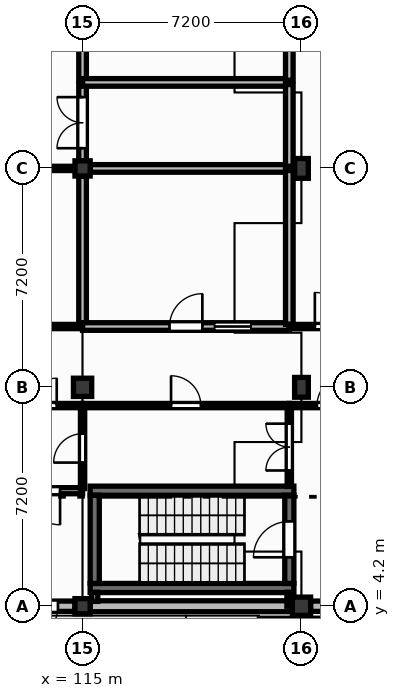
"""IFC4 building model, lengths in metres.
Left out: names, types, materials, properties, quantities, classifications, styles, units other than length and angle.
Written with IfcOpenShell. Run it as: python <this file> out.ifc"""

import sys

from ifc_helpers import new_model, si_unit, direction, frame, frame_2d, origin, origin_2d, place, context, subcontext, project, spatial, rectangle, extrude, element, fill, save


model = new_model("IFC4")
c1 = context("Model", 3, precision=1e-05, world=origin(), true_north=direction((0.0, 1.0)))
c2 = subcontext(c1, "Body", "Model", "MODEL_VIEW")
j1 = project(units=[si_unit("LENGTHUNIT", "METRE"), si_unit("PLANEANGLEUNIT", "RADIAN")], contexts=[c1])
p1 = place(None, origin())
s1 = spatial("IfcSite", under=j1, at=p1, CompositionType="ELEMENT")
p2 = place(p1, origin())
s2 = spatial("IfcBuilding", under=s1, at=p2, CompositionType="ELEMENT")
p3 = place(p2, origin())
s3 = spatial("IfcBuildingStorey", under=s2, at=p3, CompositionType="ELEMENT", Elevation=0.0)
p4 = place(p3, frame((115.0, 4.2, 0.0), z_axis=(0.0, 0.0, 1.0), x_axis=(1.0, 0.0, 0.0)))
e1 = element("IfcColumn", 1, at=p4, inside=s3, PredefinedType="COLUMN", context=c2, shape_type="SweptSolid", body=[
    extrude(rectangle(XDim=0.5, YDim=0.5, at=origin_2d()), origin(), (0.0, 0.0, 1.0), 4.2),
])
p5 = place(p3, frame((115.0, 11.4, 0.0), z_axis=(0.0, 0.0, 1.0), x_axis=(1.0, 0.0, 0.0)))
e2 = element("IfcColumn", 2, at=p5, inside=s3, PredefinedType="COLUMN", context=c2, shape_type="SweptSolid", body=[
    extrude(rectangle(XDim=0.6, YDim=0.6, at=origin_2d()), origin(), (0.0, 0.0, 1.0), 4.2),
])
p6 = place(p3, frame((115.0, 18.6, 0.0), z_axis=(0.0, 0.0, 1.0), x_axis=(1.0, 0.0, 0.0)))
e3 = element("IfcColumn", 3, at=p6, inside=s3, PredefinedType="COLUMN", context=c2, shape_type="SweptSolid", body=[
    extrude(rectangle(XDim=0.5, YDim=0.5, at=origin_2d()), origin(), (0.0, 0.0, 1.0), 4.2),
])
p7 = place(p3, frame((122.2, 4.2, 0.0), z_axis=(0.0, 0.0, 1.0), x_axis=(1.0, 0.0, 0.0)))
e4 = element("IfcColumn", 4, at=p7, inside=s3, PredefinedType="COLUMN", context=c2, shape_type="SweptSolid", body=[
    extrude(rectangle(XDim=0.6, YDim=0.6, at=origin_2d()), origin(), (0.0, 0.0, 1.0), 4.2),
])
for number, where, z_axis, x_axis in (
    (5, (122.2, 11.4, 0.0), (0.0, 0.0, 1.0), (1.0, 0.0, 0.0)),
    (6, (122.2, 18.6, 0.0), (0.0, 0.0, 1.0), (1.0, 0.0, 0.0)),
):
    element("IfcColumn", number, at=place(p3, frame(where, z_axis=z_axis, x_axis=x_axis)), inside=s3, PredefinedType="COLUMN", context=c2, shape_type="SweptSolid", body=[
        extrude(rectangle(XDim=0.45, YDim=0.65, at=origin_2d()), origin(), (0.0, 0.0, 1.0), 4.2),
    ])
p8 = place(p3, frame((108.025, 4.2, 0.0), z_axis=(0.0, 0.0, 1.0), x_axis=(1.0, 0.0, 0.0)))
e7 = element("IfcWall", 7, at=p8, inside=s3, PredefinedType="SOLIDWALL", context=c2, shape_type="SweptSolid", body=[
    extrude(rectangle(XDim=6.725, YDim=0.34, at=frame_2d((3.363, 0.0))), origin(), (0.0, 0.0, 1.0), 3.68),
])
p9 = place(p8, frame((4.985, 0.0, 0.0)))
e8 = element("IfcOpeningElement", 8, at=p9, cuts=e7, PredefinedType="OPENING", context=c2, shape_type="SweptSolid", body=[
    extrude(rectangle(XDim=1.18, YDim=2.2, at=frame_2d((0.59, 1.1))), frame((0.0, 0.18, 0.0), z_axis=(0.0, -1.0, 0.0), x_axis=(1.0, 0.0, 0.0)), (0.0, 0.0, 1.0), 0.36),
])
p10 = place(p8, frame((1.522, 0.0, 1.35)))
e9 = element("IfcOpeningElement", 9, at=p10, cuts=e7, PredefinedType="OPENING", context=c2, shape_type="SweptSolid", body=[
    extrude(rectangle(XDim=1.45, YDim=1.4, at=frame_2d((0.725, 0.7))), frame((0.0, 0.18, 0.0), z_axis=(0.0, -1.0, 0.0), x_axis=(1.0, 0.0, 0.0)), (0.0, 0.0, 1.0), 0.36),
])
p11 = place(p3, frame((115.25, 4.2, 0.0), z_axis=(0.0, 0.0, 1.0), x_axis=(1.0, 0.0, 0.0)))
e10 = element("IfcWall", 10, at=p11, inside=s3, PredefinedType="SOLIDWALL", context=c2, shape_type="SweptSolid", body=[
    extrude(rectangle(XDim=6.65, YDim=0.36, at=frame_2d((3.325, 0.0))), origin(), (0.0, 0.0, 1.0), 3.68),
])
p12 = place(p3, frame((122.5, 4.2, 0.0), z_axis=(0.0, 0.0, 1.0), x_axis=(1.0, 0.0, 0.0)))
e11 = element("IfcWall", 11, at=p12, inside=s3, PredefinedType="SOLIDWALL", context=c2, shape_type="SweptSolid", body=[
    extrude(rectangle(XDim=5.85, YDim=0.34, at=frame_2d((2.925, 0.0))), origin(), (0.0, 0.0, 1.0), 3.68),
])
p13 = place(p12, frame((3.305, 0.0, 1.0)))
e12 = element("IfcOpeningElement", 12, at=p13, cuts=e11, PredefinedType="OPENING", context=c2, shape_type="SweptSolid", body=[
    extrude(rectangle(XDim=1.22, YDim=2.2, at=frame_2d((0.61, 1.1))), frame((0.0, 0.18, 0.0), z_axis=(0.0, -1.0, 0.0), x_axis=(1.0, 0.0, 0.0)), (0.0, 0.0, 1.0), 0.36),
])
for number, where, z_axis, x_axis in (
    (13, (115.25, 4.8, 0.0), (0.0, 0.0, 1.0), (1.0, 0.0, 0.0)),
    (14, (115.25, 8.0, 0.0), (0.0, 0.0, 1.0), (1.0, 0.0, 0.0)),
):
    element("IfcWall", number, at=place(p3, frame(where, z_axis=z_axis, x_axis=x_axis)), inside=s3, PredefinedType="SHEAR", context=c2, shape_type="SweptSolid", body=[
        extrude(rectangle(XDim=6.7, YDim=0.3, at=frame_2d((3.35, 0.0))), origin(), (0.0, 0.0, 1.0), 4.25),
    ])
p14 = place(p3, frame((115.4, 4.95, 0.0), z_axis=(0.0, 0.0, 1.0), x_axis=(0.0, 1.0, 0.0)))
e15 = element("IfcWall", 15, at=p14, inside=s3, PredefinedType="SHEAR", context=c2, shape_type="SweptSolid", body=[
    extrude(rectangle(XDim=2.9, YDim=0.3, at=frame_2d((1.45, 0.0))), origin(), (0.0, 0.0, 1.0), 4.25),
])
p15 = place(p3, frame((121.8, 4.95, 0.0), z_axis=(0.0, 0.0, 1.0), x_axis=(0.0, 1.0, 0.0)))
e16 = element("IfcWall", 16, at=p15, inside=s3, PredefinedType="SHEAR", context=c2, shape_type="SweptSolid", body=[
    extrude(rectangle(XDim=2.9, YDim=0.3, at=frame_2d((1.45, 0.0))), origin(), (0.0, 0.0, 1.0), 4.25),
])
p16 = place(p15, frame((0.86, 0.0, 0.0)))
e17 = element("IfcOpeningElement", 17, at=p16, cuts=e16, PredefinedType="OPENING", context=c2, shape_type="SweptSolid", body=[
    extrude(rectangle(XDim=1.18, YDim=2.15, at=frame_2d((0.59, 1.075))), frame((0.0, 0.16, 0.0), z_axis=(0.0, -1.0, 0.0), x_axis=(1.0, 0.0, 0.0)), (0.0, 0.0, 1.0), 0.32),
])
p17 = place(p3, frame((110.6, 13.4, 0.0), z_axis=(0.0, 0.0, 1.0), x_axis=(1.0, 0.0, 0.0)))
e18 = element("IfcWall", 18, at=p17, inside=s3, PredefinedType="PARTITIONING", context=c2, shape_type="SweptSolid", body=[
    extrude(rectangle(XDim=4.4, YDim=0.14, at=frame_2d((2.2, 0.0))), origin(), (0.0, 0.0, 1.0), 4.18),
])
p18 = place(p3, frame((110.6, 18.6, 0.0), z_axis=(0.0, 0.0, 1.0), x_axis=(1.0, 0.0, 0.0)))
e19 = element("IfcWall", 19, at=p18, inside=s3, PredefinedType="PARTITIONING", context=c2, shape_type="SweptSolid", body=[
    extrude(rectangle(XDim=4.15, YDim=0.14, at=frame_2d((2.075, 0.0))), origin(), (0.0, 0.0, 1.0), 3.25),
])
p19 = place(p3, frame((112.4, 8.0, 0.0), z_axis=(0.0, 0.0, 1.0), x_axis=(1.0, 0.0, 0.0)))
e20 = element("IfcWall", 20, at=p19, inside=s3, PredefinedType="PARTITIONING", context=c2, shape_type="SweptSolid", body=[
    extrude(rectangle(XDim=2.6, YDim=0.2, at=frame_2d((1.3, 0.0))), origin(), (0.0, 0.0, 1.0), 4.18),
])
p20 = place(p19, frame((0.74, 0.0, 0.0)))
e21 = element("IfcOpeningElement", 21, at=p20, cuts=e20, PredefinedType="OPENING", context=c2, shape_type="SweptSolid", body=[
    extrude(rectangle(XDim=1.12, YDim=2.1, at=frame_2d((0.56, 1.05))), frame((0.0, 0.11, 0.0), z_axis=(0.0, -1.0, 0.0), x_axis=(1.0, 0.0, 0.0)), (0.0, 0.0, 1.0), 0.22),
])
p21 = place(p3, frame((112.4, 10.8, 0.0), z_axis=(0.0, 0.0, 1.0), x_axis=(1.0, 0.0, 0.0)))
e22 = element("IfcWall", 22, at=p21, inside=s3, PredefinedType="PARTITIONING", context=c2, shape_type="SweptSolid", body=[
    extrude(rectangle(XDim=2.6, YDim=0.14, at=frame_2d((1.3, 0.0))), origin(), (0.0, 0.0, 1.0), 4.18),
])
p22 = place(p21, frame((0.85, 0.0, 0.0)))
e23 = element("IfcOpeningElement", 23, at=p22, cuts=e22, PredefinedType="OPENING", context=c2, shape_type="SweptSolid", body=[
    extrude(rectangle(XDim=0.9, YDim=2.1, at=frame_2d((0.45, 1.05))), frame((0.0, 0.08, 0.0), z_axis=(0.0, -1.0, 0.0), x_axis=(1.0, 0.0, 0.0)), (0.0, 0.0, 1.0), 0.16),
])
p23 = place(p3, frame((115.0, 8.07, 0.0), z_axis=(0.0, 0.0, 1.0), x_axis=(0.0, 1.0, 0.0)))
e24 = element("IfcWall", 24, at=p23, inside=s3, PredefinedType="PARTITIONING", context=c2, shape_type="SweptSolid", body=[
    extrude(rectangle(XDim=2.66, YDim=0.14, at=frame_2d((1.33, 0.0))), origin(), (0.0, 0.0, 1.0), 3.5),
])
p24 = place(p23, frame((0.855, 0.0, 0.0)))
e25 = element("IfcOpeningElement", 25, at=p24, cuts=e24, PredefinedType="OPENING", context=c2, shape_type="SweptSolid", body=[
    extrude(rectangle(XDim=0.95, YDim=2.1, at=frame_2d((0.475, 1.05))), frame((0.0, 0.08, 0.0), z_axis=(0.0, -1.0, 0.0), x_axis=(1.0, 0.0, 0.0)), (0.0, 0.0, 1.0), 0.16),
])
p25 = place(p3, frame((115.0, 10.8, 0.0), z_axis=(0.0, 0.0, 1.0), x_axis=(1.0, 0.0, 0.0)))
e26 = element("IfcWall", 26, at=p25, inside=s3, PredefinedType="PARTITIONING", context=c2, shape_type="SweptSolid", body=[
    extrude(rectangle(XDim=6.8, YDim=0.14, at=frame_2d((3.4, 0.0))), origin(), (0.0, 0.0, 1.0), 4.18),
])
p26 = place(p25, frame((2.91, 0.0, 0.0)))
e27 = element("IfcOpeningElement", 27, at=p26, cuts=e26, PredefinedType="OPENING", context=c2, shape_type="SweptSolid", body=[
    extrude(rectangle(XDim=0.98, YDim=2.15, at=frame_2d((0.49, 1.075))), frame((0.0, 0.08, 0.0), z_axis=(0.0, -1.0, 0.0), x_axis=(1.0, 0.0, 0.0)), (0.0, 0.0, 1.0), 0.16),
])
p27 = place(p3, frame((115.0, 13.47, 0.0), z_axis=(0.0, 0.0, 1.0), x_axis=(0.0, 1.0, 0.0)))
e28 = element("IfcWall", 28, at=p27, inside=s3, PredefinedType="SOLIDWALL", context=c2, shape_type="SweptSolid", body=[
    extrude(rectangle(XDim=4.88, YDim=0.25, at=frame_2d((2.44, 0.0))), origin(), (0.0, 0.0, 1.0), 3.5),
])
p28 = place(p3, frame((115.0, 13.4, 0.0), z_axis=(0.0, 0.0, 1.0), x_axis=(1.0, 0.0, 0.0)))
e29 = element("IfcWall", 29, at=p28, inside=s3, PredefinedType="SOLIDWALL", context=c2, shape_type="SweptSolid", body=[
    extrude(rectangle(XDim=6.8, YDim=0.25, at=frame_2d((3.4, 0.0))), origin(), (0.0, 0.0, 1.0), 4.18),
])
p29 = place(p28, frame((2.86, 0.0, 0.0)))
e30 = element("IfcOpeningElement", 30, at=p29, cuts=e29, PredefinedType="OPENING", context=c2, shape_type="SweptSolid", body=[
    extrude(rectangle(XDim=1.08, YDim=2.15, at=frame_2d((0.54, 1.075))), frame((0.0, 0.135, 0.0), z_axis=(0.0, -1.0, 0.0), x_axis=(1.0, 0.0, 0.0)), (0.0, 0.0, 1.0), 0.27),
])
p30 = place(p28, frame((4.34, 0.0, 1.05)))
e31 = element("IfcOpeningElement", 31, at=p30, cuts=e29, PredefinedType="OPENING", context=c2, shape_type="SweptSolid", body=[
    extrude(rectangle(XDim=1.2, YDim=1.1, at=frame_2d((0.6, 0.55))), frame((0.0, 0.135, 0.0), z_axis=(0.0, -1.0, 0.0), x_axis=(1.0, 0.0, 0.0)), (0.0, 0.0, 1.0), 0.27),
])
p31 = place(p3, frame((115.0, 18.85, 0.0), z_axis=(0.0, 0.0, 1.0), x_axis=(0.0, 1.0, 0.0)))
e32 = element("IfcWall", 32, at=p31, inside=s3, PredefinedType="SOLIDWALL", context=c2, shape_type="SweptSolid", body=[
    extrude(rectangle(XDim=2.509, YDim=0.25, at=frame_2d((1.254, 0.0))), origin(), (0.0, 0.0, 1.0), 3.4),
])
p32 = place(p31, frame((0.415, 0.0, 0.0)))
e33 = element("IfcOpeningElement", 33, at=p32, cuts=e32, PredefinedType="OPENING", context=c2, shape_type="SweptSolid", body=[
    extrude(rectangle(XDim=1.68, YDim=2.3, at=frame_2d((0.84, 1.15))), frame((0.0, 0.135, 0.0), z_axis=(0.0, -1.0, 0.0), x_axis=(1.0, 0.0, 0.0)), (0.0, 0.0, 1.0), 0.27),
])
p33 = place(p3, frame((115.25, 18.6, 0.0), z_axis=(0.0, 0.0, 1.0), x_axis=(1.0, 0.0, 0.0)))
e34 = element("IfcWall", 34, at=p33, inside=s3, PredefinedType="SOLIDWALL", context=c2, shape_type="SweptSolid", body=[
    extrude(rectangle(XDim=6.55, YDim=0.25, at=frame_2d((3.275, 0.0))), origin(), (0.0, 0.0, 1.0), 3.25),
])
p34 = place(p3, frame((115.0, 21.499, 0.0), z_axis=(0.0, 0.0, 1.0), x_axis=(0.0, 1.0, 0.0)))
e35 = element("IfcWall", 35, at=p34, inside=s3, PredefinedType="SOLIDWALL", context=c2, shape_type="SweptSolid", body=[
    extrude(rectangle(XDim=5.451, YDim=0.25, at=frame_2d((2.726, 0.0))), origin(), (0.0, 0.0, 1.0), 3.4),
])
p35 = place(p34, frame((2.186, 0.0, 0.0)))
e36 = element("IfcOpeningElement", 36, at=p35, cuts=e35, PredefinedType="OPENING", context=c2, shape_type="SweptSolid", body=[
    extrude(rectangle(XDim=1.08, YDim=2.15, at=frame_2d((0.54, 1.075))), frame((0.0, 0.135, 0.0), z_axis=(0.0, -1.0, 0.0), x_axis=(1.0, 0.0, 0.0)), (0.0, 0.0, 1.0), 0.27),
])
p36 = place(p34, frame((3.666, 0.0, 1.05)))
e37 = element("IfcOpeningElement", 37, at=p36, cuts=e35, PredefinedType="OPENING", context=c2, shape_type="SweptSolid", body=[
    extrude(rectangle(XDim=1.4, YDim=1.1, at=frame_2d((0.7, 0.55))), frame((0.0, 0.135, 0.0), z_axis=(0.0, -1.0, 0.0), x_axis=(1.0, 0.0, 0.0)), (0.0, 0.0, 1.0), 0.27),
])
p37 = place(p3, frame((115.0, 21.429, 0.0), z_axis=(0.0, 0.0, 1.0), x_axis=(1.0, 0.0, 0.0)))
e38 = element("IfcWall", 38, at=p37, inside=s3, PredefinedType="SOLIDWALL", context=c2, shape_type="SweptSolid", body=[
    extrude(rectangle(XDim=6.8, YDim=0.25, at=frame_2d((3.4, 0.0))), origin(), (0.0, 0.0, 1.0), 4.18),
])
p38 = place(p3, frame((121.8, 8.14, 0.0), z_axis=(0.0, 0.0, 1.0), x_axis=(0.0, 1.0, 0.0)))
e39 = element("IfcWall", 39, at=p38, inside=s3, PredefinedType="PARTITIONING", context=c2, shape_type="SweptSolid", body=[
    extrude(rectangle(XDim=2.59, YDim=0.14, at=frame_2d((1.295, 0.0))), origin(), (0.0, 0.0, 1.0), 4.18),
])
p39 = place(p38, frame((0.525, 0.0, 0.0)))
e40 = element("IfcOpeningElement", 40, at=p39, cuts=e39, PredefinedType="OPENING", context=c2, shape_type="SweptSolid", body=[
    extrude(rectangle(XDim=1.54, YDim=2.25, at=frame_2d((0.77, 1.125))), frame((0.0, 0.08, 0.0), z_axis=(0.0, -1.0, 0.0), x_axis=(1.0, 0.0, 0.0)), (0.0, 0.0, 1.0), 0.16),
])
p40 = place(p3, frame((121.8, 10.8, 0.0), z_axis=(0.0, 0.0, 1.0), x_axis=(1.0, 0.0, 0.0)))
e41 = element("IfcWall", 41, at=p40, inside=s3, PredefinedType="PARTITIONING", context=c2, shape_type="SweptSolid", body=[
    extrude(rectangle(XDim=2.8, YDim=0.14, at=frame_2d((1.4, 0.0))), origin(), (0.0, 0.0, 1.0), 4.18),
])
p41 = place(p40, frame((0.91, 0.0, 0.0)))
e42 = element("IfcOpeningElement", 42, at=p41, cuts=e41, PredefinedType="OPENING", context=c2, shape_type="SweptSolid", body=[
    extrude(rectangle(XDim=0.98, YDim=2.15, at=frame_2d((0.49, 1.075))), frame((0.0, 0.08, 0.0), z_axis=(0.0, -1.0, 0.0), x_axis=(1.0, 0.0, 0.0)), (0.0, 0.0, 1.0), 0.16),
])
p42 = place(p3, frame((121.8, 13.47, 0.0), z_axis=(0.0, 0.0, 1.0), x_axis=(0.0, 1.0, 0.0)))
e43 = element("IfcWall", 43, at=p42, inside=s3, PredefinedType="SOLIDWALL", context=c2, shape_type="SweptSolid", body=[
    extrude(rectangle(XDim=5.06, YDim=0.25, at=frame_2d((2.53, 0.0))), origin(), (0.0, 0.0, 1.0), 4.18),
])
p43 = place(p3, frame((121.8, 13.4, 0.0), z_axis=(0.0, 0.0, 1.0), x_axis=(1.0, 0.0, 0.0)))
e44 = element("IfcWall", 44, at=p43, inside=s3, PredefinedType="PARTITIONING", context=c2, shape_type="SweptSolid", body=[
    extrude(rectangle(XDim=2.8, YDim=0.14, at=frame_2d((1.4, 0.0))), origin(), (0.0, 0.0, 1.0), 4.18),
])
p44 = place(p43, frame((0.84, 0.0, 0.0)))
e45 = element("IfcOpeningElement", 45, at=p44, cuts=e44, PredefinedType="OPENING", context=c2, shape_type="SweptSolid", body=[
    extrude(rectangle(XDim=1.12, YDim=2.15, at=frame_2d((0.56, 1.075))), frame((0.0, 0.08, 0.0), z_axis=(0.0, -1.0, 0.0), x_axis=(1.0, 0.0, 0.0)), (0.0, 0.0, 1.0), 0.16),
])
p45 = place(p3, frame((121.8, 18.67, 0.0), z_axis=(0.0, 0.0, 1.0), x_axis=(0.0, 1.0, 0.0)))
e46 = element("IfcWall", 46, at=p45, inside=s3, PredefinedType="SOLIDWALL", context=c2, shape_type="SweptSolid", body=[
    extrude(rectangle(XDim=2.689, YDim=0.25, at=frame_2d((1.344, 0.0))), origin(), (0.0, 0.0, 1.0), 4.18),
])
p46 = place(p3, frame((121.8, 21.499, 0.0), z_axis=(0.0, 0.0, 1.0), x_axis=(0.0, 1.0, 0.0)))
e47 = element("IfcWall", 47, at=p46, inside=s3, PredefinedType="SOLIDWALL", context=c2, shape_type="SweptSolid", body=[
    extrude(rectangle(XDim=5.631, YDim=0.25, at=frame_2d((2.815, 0.0))), origin(), (0.0, 0.0, 1.0), 4.18),
])
p47 = place(p3, frame((115.4, 4.36, 0.0), z_axis=(0.0, 0.0, 1.0), x_axis=(0.0, 1.0, 0.0)))
e48 = element("IfcWall", 48, at=p47, inside=s3, PredefinedType="PARTITIONING", context=c2, shape_type="SweptSolid", body=[
    extrude(rectangle(XDim=0.3, YDim=0.2, at=frame_2d((0.15, 0.0))), origin(), (0.0, 0.0, 1.0), 4.18),
])
p48 = place(p3, frame((121.8, 4.2, 0.0), z_axis=(0.0, 0.0, 1.0), x_axis=(0.0, 1.0, 0.0)))
e49 = element("IfcWall", 49, at=p48, inside=s3, PredefinedType="PARTITIONING", context=c2, shape_type="SweptSolid", body=[
    extrude(rectangle(XDim=0.46, YDim=0.16, at=frame_2d((0.23, 0.0))), origin(), (0.0, 0.0, 1.0), 4.18),
])
p49 = place(p9, frame((1.18, 0.0, 0.0), z_axis=(0.0, 0.0, 1.0), x_axis=(-1.0, 0.0, 0.0)))
e50 = element("IfcDoor", 50, at=p49, inside=s3, OperationType="SINGLE_SWING_RIGHT", PredefinedType="DOOR", context=c2, shape_type="SweptSolid", body=[
    extrude(rectangle(XDim=1.18, YDim=2.2, at=frame_2d((0.59, 1.1))), frame((0.0, 0.025, 0.0), z_axis=(0.0, -1.0, 0.0), x_axis=(1.0, 0.0, 0.0)), (0.0, 0.0, 1.0), 0.05),
])
fill(e8, e50)
p50 = place(p20, frame((1.12, 0.0, 0.0), z_axis=(0.0, 0.0, 1.0), x_axis=(-1.0, 0.0, 0.0)))
e51 = element("IfcDoor", 51, at=p50, inside=s3, OperationType="SINGLE_SWING_LEFT", PredefinedType="DOOR", context=c2, shape_type="SweptSolid", body=[
    extrude(rectangle(XDim=1.12, YDim=2.1, at=frame_2d((0.56, 1.05))), frame((0.0, 0.025, 0.0), z_axis=(0.0, -1.0, 0.0), x_axis=(1.0, 0.0, 0.0)), (0.0, 0.0, 1.0), 0.05),
])
fill(e21, e51)
p51 = place(p16, origin())
e52 = element("IfcDoor", 52, at=p51, inside=s3, OperationType="SINGLE_SWING_LEFT", PredefinedType="DOOR", context=c2, shape_type="SweptSolid", body=[
    extrude(rectangle(XDim=1.18, YDim=2.15, at=frame_2d((0.59, 1.075))), frame((0.0, 0.025, 0.0), z_axis=(0.0, -1.0, 0.0), x_axis=(1.0, 0.0, 0.0)), (0.0, 0.0, 1.0), 0.05),
])
fill(e17, e52)
p52 = place(p41, origin())
e53 = element("IfcDoor", 53, at=p52, inside=s3, OperationType="SINGLE_SWING_RIGHT", PredefinedType="DOOR", context=c2, shape_type="SweptSolid", body=[
    extrude(rectangle(XDim=0.98, YDim=2.15, at=frame_2d((0.49, 1.075))), frame((0.0, 0.025, 0.0), z_axis=(0.0, -1.0, 0.0), x_axis=(1.0, 0.0, 0.0)), (0.0, 0.0, 1.0), 0.05),
])
fill(e42, e53)
p53 = place(p44, origin())
e54 = element("IfcDoor", 54, at=p53, inside=s3, OperationType="SINGLE_SWING_LEFT", PredefinedType="DOOR", context=c2, shape_type="SweptSolid", body=[
    extrude(rectangle(XDim=1.12, YDim=2.15, at=frame_2d((0.56, 1.075))), frame((0.0, 0.025, 0.0), z_axis=(0.0, -1.0, 0.0), x_axis=(1.0, 0.0, 0.0)), (0.0, 0.0, 1.0), 0.05),
])
fill(e45, e54)
p54 = place(p22, origin())
e55 = element("IfcDoor", 55, at=p54, inside=s3, OperationType="SINGLE_SWING_RIGHT", PredefinedType="DOOR", context=c2, shape_type="SweptSolid", body=[
    extrude(rectangle(XDim=0.9, YDim=2.1, at=frame_2d((0.45, 1.05))), frame((0.0, 0.025, 0.0), z_axis=(0.0, -1.0, 0.0), x_axis=(1.0, 0.0, 0.0)), (0.0, 0.0, 1.0), 0.05),
])
fill(e23, e55)
p55 = place(p26, origin())
e56 = element("IfcDoor", 56, at=p55, inside=s3, OperationType="SINGLE_SWING_LEFT", PredefinedType="DOOR", context=c2, shape_type="SweptSolid", body=[
    extrude(rectangle(XDim=0.98, YDim=2.15, at=frame_2d((0.49, 1.075))), frame((0.0, 0.025, 0.0), z_axis=(0.0, -1.0, 0.0), x_axis=(1.0, 0.0, 0.0)), (0.0, 0.0, 1.0), 0.05),
])
fill(e27, e56)
p56 = place(p39, origin())
e57 = element("IfcDoor", 57, at=p56, inside=s3, OperationType="DOUBLE_DOOR_SINGLE_SWING", PredefinedType="DOOR", context=c2, shape_type="SweptSolid", body=[
    extrude(rectangle(XDim=1.54, YDim=2.25, at=frame_2d((0.77, 1.125))), frame((0.0, 0.025, 0.0), z_axis=(0.0, -1.0, 0.0), x_axis=(1.0, 0.0, 0.0)), (0.0, 0.0, 1.0), 0.05),
])
fill(e40, e57)
p57 = place(p24, origin())
e58 = element("IfcDoor", 58, at=p57, inside=s3, OperationType="SINGLE_SWING_LEFT", PredefinedType="DOOR", context=c2, shape_type="SweptSolid", body=[
    extrude(rectangle(XDim=0.95, YDim=2.1, at=frame_2d((0.475, 1.05))), frame((0.0, 0.025, 0.0), z_axis=(0.0, -1.0, 0.0), x_axis=(1.0, 0.0, 0.0)), (0.0, 0.0, 1.0), 0.05),
])
fill(e25, e58)
p58 = place(p29, origin())
e59 = element("IfcDoor", 59, at=p58, inside=s3, OperationType="SINGLE_SWING_RIGHT", PredefinedType="DOOR", context=c2, shape_type="SweptSolid", body=[
    extrude(rectangle(XDim=1.08, YDim=2.15, at=frame_2d((0.54, 1.075))), frame((0.0, 0.025, 0.0), z_axis=(0.0, -1.0, 0.0), x_axis=(1.0, 0.0, 0.0)), (0.0, 0.0, 1.0), 0.05),
])
fill(e30, e59)
p59 = place(p30, origin())
e60 = element("IfcWindow", 60, at=p59, inside=s3, PartitioningType="SINGLE_PANEL", PredefinedType="WINDOW", context=c2, shape_type="SweptSolid", body=[
    extrude(rectangle(XDim=1.2, YDim=1.1, at=frame_2d((0.6, 0.55))), frame((0.0, 0.03, 0.0), z_axis=(0.0, -1.0, 0.0), x_axis=(1.0, 0.0, 0.0)), (0.0, 0.0, 1.0), 0.06),
])
fill(e31, e60)
p60 = place(p32, origin())
e61 = element("IfcDoor", 61, at=p60, inside=s3, OperationType="DOUBLE_DOOR_SINGLE_SWING", PredefinedType="DOOR", context=c2, shape_type="SweptSolid", body=[
    extrude(rectangle(XDim=1.68, YDim=2.3, at=frame_2d((0.84, 1.15))), frame((0.0, 0.025, 0.0), z_axis=(0.0, -1.0, 0.0), x_axis=(1.0, 0.0, 0.0)), (0.0, 0.0, 1.0), 0.05),
])
fill(e33, e61)
save(model, sys.argv[1])
